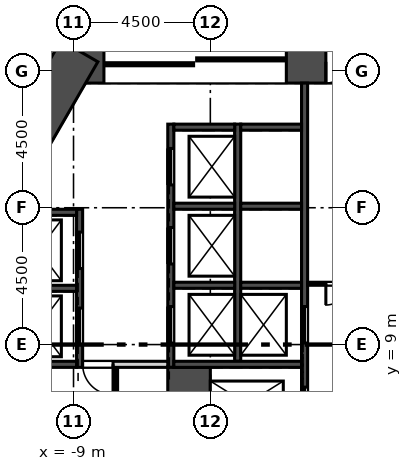
"""IFC4 building model, lengths in metres.
Left out: names, types, materials, properties, quantities, classifications, styles, units other than length and angle.
Written with IfcOpenShell. Run it as: python <this file> out.ifc"""

import sys

from ifc_helpers import new_model, si_unit, direction, frame, frame_2d, origin, place, context, subcontext, project, spatial, rectangle, extrude, element, fill, save


model = new_model("IFC4")
c1 = context("Model", 3, precision=1e-05, world=origin(), true_north=direction((0.0, 1.0)))
c2 = subcontext(c1, "Body", "Model", "MODEL_VIEW")
j1 = project(units=[si_unit("LENGTHUNIT", "METRE"), si_unit("PLANEANGLEUNIT", "RADIAN")], contexts=[c1])
p1 = place(None, origin())
s1 = spatial("IfcSite", under=j1, at=p1, CompositionType="ELEMENT")
p2 = place(p1, origin())
s2 = spatial("IfcBuilding", under=s1, at=p2, CompositionType="ELEMENT")
p3 = place(p2, frame((0.0, 0.0, 20.0)))
s3 = spatial("IfcBuildingStorey", under=s2, at=p3, CompositionType="ELEMENT", Elevation=20.0)
p4 = place(p3, frame((9.412, 18.3, 0.0), z_axis=(0.0, 0.0, 1.0), x_axis=(-1.0, 0.0, 0.0)))
e1 = element("IfcWall", 1, at=p4, inside=s3, PredefinedType="SHEAR", context=c2, shape_type="SweptSolid", body=[
    extrude(rectangle(XDim=18.823, YDim=1.4, at=frame_2d((9.412, 0.0))), origin(), (0.0, 0.0, 1.0), 5.0),
])
p5 = place(p4, frame((8.711, 0.0, 0.0)))
e2 = element("IfcOpeningElement", 2, at=p5, cuts=e1, PredefinedType="OPENING", context=c2, shape_type="SweptSolid", body=[
    extrude(rectangle(XDim=1.4, YDim=2.1, at=frame_2d((0.7, 1.05))), frame((0.0, 0.71, 0.0), z_axis=(0.0, -1.0, 0.0), x_axis=(1.0, 0.0, 0.0)), (0.0, 0.0, 1.0), 1.42),
])
p6 = place(p4, frame((11.412, 0.0, 0.0)))
e3 = element("IfcOpeningElement", 3, at=p6, cuts=e1, PredefinedType="OPENING", context=c2, shape_type="SweptSolid", body=[
    extrude(rectangle(XDim=6.0, YDim=2.4, at=frame_2d((3.0, 1.2))), frame((0.0, 0.71, 0.0), z_axis=(0.0, -1.0, 0.0), x_axis=(1.0, 0.0, 0.0)), (0.0, 0.0, 1.0), 1.42),
])
p7 = place(p4, frame((1.412, 0.0, 0.0)))
e4 = element("IfcOpeningElement", 4, at=p7, cuts=e1, PredefinedType="OPENING", context=c2, shape_type="SweptSolid", body=[
    extrude(rectangle(XDim=6.0, YDim=2.4, at=frame_2d((3.0, 1.2))), frame((0.0, 0.71, 0.0), z_axis=(0.0, -1.0, 0.0), x_axis=(1.0, 0.0, 0.0)), (0.0, 0.0, 1.0), 1.42),
])
p8 = place(p3, frame((-8.805, 18.65, 0.0), z_axis=(0.0, 0.0, 1.0), x_axis=(-0.50000187635, -0.866024320471, 0.0)))
e5 = element("IfcWall", 5, at=p8, inside=s3, PredefinedType="SHEAR", context=c2, shape_type="SweptSolid", body=[
    extrude(rectangle(XDim=9.177, YDim=1.4, at=frame_2d((4.588, 0.0))), origin(), (0.0, 0.0, 1.0), 5.0),
])
p9 = place(p3, frame((-4.853, 74.393, 0.0), z_axis=(0.0, 0.0, 1.0), x_axis=(-0.49999894854, -0.866026010844, 0.0)))
e6 = element("IfcWall", 6, at=p9, inside=s3, PredefinedType="SOLIDWALL", context=c2, shape_type="SweptSolid", body=[
    extrude(rectangle(XDim=76.0, YDim=0.34, at=frame_2d((38.0, 0.0))), origin(), (0.0, 0.0, 1.0), 3.0),
])
p10 = place(p9, frame((1.058, 0.0, 0.9)))
e7 = element("IfcOpeningElement", 7, at=p10, cuts=e6, PredefinedType="OPENING", context=c2, shape_type="SweptSolid", body=[
    extrude(rectangle(XDim=1.885, YDim=1.9, at=frame_2d((0.942, 0.95))), frame((0.0, 0.18, 0.0), z_axis=(0.0, -1.0, 0.0), x_axis=(1.0, 0.0, 0.0)), (0.0, 0.0, 1.0), 0.36),
])
p11 = place(p9, frame((4.058, 0.0, 0.9)))
e8 = element("IfcOpeningElement", 8, at=p11, cuts=e6, PredefinedType="OPENING", context=c2, shape_type="SweptSolid", body=[
    extrude(rectangle(XDim=1.885, YDim=1.9, at=frame_2d((0.942, 0.95))), frame((0.0, 0.18, 0.0), z_axis=(0.0, -1.0, 0.0), x_axis=(1.0, 0.0, 0.0)), (0.0, 0.0, 1.0), 0.36),
])
p12 = place(p9, frame((7.058, 0.0, 0.9)))
e9 = element("IfcOpeningElement", 9, at=p12, cuts=e6, PredefinedType="OPENING", context=c2, shape_type="SweptSolid", body=[
    extrude(rectangle(XDim=1.885, YDim=1.9, at=frame_2d((0.942, 0.95))), frame((0.0, 0.18, 0.0), z_axis=(0.0, -1.0, 0.0), x_axis=(1.0, 0.0, 0.0)), (0.0, 0.0, 1.0), 0.36),
])
p13 = place(p9, frame((10.058, 0.0, 0.9)))
e10 = element("IfcOpeningElement", 10, at=p13, cuts=e6, PredefinedType="OPENING", context=c2, shape_type="SweptSolid", body=[
    extrude(rectangle(XDim=1.885, YDim=1.9, at=frame_2d((0.942, 0.95))), frame((0.0, 0.18, 0.0), z_axis=(0.0, -1.0, 0.0), x_axis=(1.0, 0.0, 0.0)), (0.0, 0.0, 1.0), 0.36),
])
p14 = place(p9, frame((13.058, 0.0, 0.9)))
e11 = element("IfcOpeningElement", 11, at=p14, cuts=e6, PredefinedType="OPENING", context=c2, shape_type="SweptSolid", body=[
    extrude(rectangle(XDim=1.885, YDim=1.9, at=frame_2d((0.942, 0.95))), frame((0.0, 0.18, 0.0), z_axis=(0.0, -1.0, 0.0), x_axis=(1.0, 0.0, 0.0)), (0.0, 0.0, 1.0), 0.36),
])
p15 = place(p9, frame((16.058, 0.0, 0.9)))
e12 = element("IfcOpeningElement", 12, at=p15, cuts=e6, PredefinedType="OPENING", context=c2, shape_type="SweptSolid", body=[
    extrude(rectangle(XDim=1.885, YDim=1.9, at=frame_2d((0.942, 0.95))), frame((0.0, 0.18, 0.0), z_axis=(0.0, -1.0, 0.0), x_axis=(1.0, 0.0, 0.0)), (0.0, 0.0, 1.0), 0.36),
])
p16 = place(p9, frame((19.058, 0.0, 0.9)))
e13 = element("IfcOpeningElement", 13, at=p16, cuts=e6, PredefinedType="OPENING", context=c2, shape_type="SweptSolid", body=[
    extrude(rectangle(XDim=1.885, YDim=1.9, at=frame_2d((0.942, 0.95))), frame((0.0, 0.18, 0.0), z_axis=(0.0, -1.0, 0.0), x_axis=(1.0, 0.0, 0.0)), (0.0, 0.0, 1.0), 0.36),
])
p17 = place(p9, frame((22.058, 0.0, 0.9)))
e14 = element("IfcOpeningElement", 14, at=p17, cuts=e6, PredefinedType="OPENING", context=c2, shape_type="SweptSolid", body=[
    extrude(rectangle(XDim=1.885, YDim=1.9, at=frame_2d((0.942, 0.95))), frame((0.0, 0.18, 0.0), z_axis=(0.0, -1.0, 0.0), x_axis=(1.0, 0.0, 0.0)), (0.0, 0.0, 1.0), 0.36),
])
p18 = place(p9, frame((25.058, 0.0, 0.9)))
e15 = element("IfcOpeningElement", 15, at=p18, cuts=e6, PredefinedType="OPENING", context=c2, shape_type="SweptSolid", body=[
    extrude(rectangle(XDim=1.885, YDim=1.9, at=frame_2d((0.942, 0.95))), frame((0.0, 0.18, 0.0), z_axis=(0.0, -1.0, 0.0), x_axis=(1.0, 0.0, 0.0)), (0.0, 0.0, 1.0), 0.36),
])
p19 = place(p9, frame((28.058, 0.0, 0.9)))
e16 = element("IfcOpeningElement", 16, at=p19, cuts=e6, PredefinedType="OPENING", context=c2, shape_type="SweptSolid", body=[
    extrude(rectangle(XDim=1.885, YDim=1.9, at=frame_2d((0.942, 0.95))), frame((0.0, 0.18, 0.0), z_axis=(0.0, -1.0, 0.0), x_axis=(1.0, 0.0, 0.0)), (0.0, 0.0, 1.0), 0.36),
])
p20 = place(p9, frame((31.058, 0.0, 0.9)))
e17 = element("IfcOpeningElement", 17, at=p20, cuts=e6, PredefinedType="OPENING", context=c2, shape_type="SweptSolid", body=[
    extrude(rectangle(XDim=1.885, YDim=1.9, at=frame_2d((0.942, 0.95))), frame((0.0, 0.18, 0.0), z_axis=(0.0, -1.0, 0.0), x_axis=(1.0, 0.0, 0.0)), (0.0, 0.0, 1.0), 0.36),
])
p21 = place(p9, frame((34.058, 0.0, 0.9)))
e18 = element("IfcOpeningElement", 18, at=p21, cuts=e6, PredefinedType="OPENING", context=c2, shape_type="SweptSolid", body=[
    extrude(rectangle(XDim=1.885, YDim=1.9, at=frame_2d((0.942, 0.95))), frame((0.0, 0.18, 0.0), z_axis=(0.0, -1.0, 0.0), x_axis=(1.0, 0.0, 0.0)), (0.0, 0.0, 1.0), 0.36),
])
p22 = place(p9, frame((37.058, 0.0, 0.9)))
e19 = element("IfcOpeningElement", 19, at=p22, cuts=e6, PredefinedType="OPENING", context=c2, shape_type="SweptSolid", body=[
    extrude(rectangle(XDim=1.885, YDim=1.9, at=frame_2d((0.942, 0.95))), frame((0.0, 0.18, 0.0), z_axis=(0.0, -1.0, 0.0), x_axis=(1.0, 0.0, 0.0)), (0.0, 0.0, 1.0), 0.36),
])
p23 = place(p9, frame((40.058, 0.0, 0.9)))
e20 = element("IfcOpeningElement", 20, at=p23, cuts=e6, PredefinedType="OPENING", context=c2, shape_type="SweptSolid", body=[
    extrude(rectangle(XDim=1.885, YDim=1.9, at=frame_2d((0.942, 0.95))), frame((0.0, 0.18, 0.0), z_axis=(0.0, -1.0, 0.0), x_axis=(1.0, 0.0, 0.0)), (0.0, 0.0, 1.0), 0.36),
])
p24 = place(p9, frame((43.058, 0.0, 0.9)))
e21 = element("IfcOpeningElement", 21, at=p24, cuts=e6, PredefinedType="OPENING", context=c2, shape_type="SweptSolid", body=[
    extrude(rectangle(XDim=1.885, YDim=1.9, at=frame_2d((0.942, 0.95))), frame((0.0, 0.18, 0.0), z_axis=(0.0, -1.0, 0.0), x_axis=(1.0, 0.0, 0.0)), (0.0, 0.0, 1.0), 0.36),
])
p25 = place(p9, frame((46.058, 0.0, 0.9)))
e22 = element("IfcOpeningElement", 22, at=p25, cuts=e6, PredefinedType="OPENING", context=c2, shape_type="SweptSolid", body=[
    extrude(rectangle(XDim=1.885, YDim=1.9, at=frame_2d((0.942, 0.95))), frame((0.0, 0.18, 0.0), z_axis=(0.0, -1.0, 0.0), x_axis=(1.0, 0.0, 0.0)), (0.0, 0.0, 1.0), 0.36),
])
p26 = place(p9, frame((49.058, 0.0, 0.9)))
e23 = element("IfcOpeningElement", 23, at=p26, cuts=e6, PredefinedType="OPENING", context=c2, shape_type="SweptSolid", body=[
    extrude(rectangle(XDim=1.885, YDim=1.9, at=frame_2d((0.942, 0.95))), frame((0.0, 0.18, 0.0), z_axis=(0.0, -1.0, 0.0), x_axis=(1.0, 0.0, 0.0)), (0.0, 0.0, 1.0), 0.36),
])
p27 = place(p9, frame((52.058, 0.0, 0.9)))
e24 = element("IfcOpeningElement", 24, at=p27, cuts=e6, PredefinedType="OPENING", context=c2, shape_type="SweptSolid", body=[
    extrude(rectangle(XDim=1.885, YDim=1.9, at=frame_2d((0.942, 0.95))), frame((0.0, 0.18, 0.0), z_axis=(0.0, -1.0, 0.0), x_axis=(1.0, 0.0, 0.0)), (0.0, 0.0, 1.0), 0.36),
])
p28 = place(p9, frame((55.058, 0.0, 0.9)))
e25 = element("IfcOpeningElement", 25, at=p28, cuts=e6, PredefinedType="OPENING", context=c2, shape_type="SweptSolid", body=[
    extrude(rectangle(XDim=1.885, YDim=1.9, at=frame_2d((0.942, 0.95))), frame((0.0, 0.18, 0.0), z_axis=(0.0, -1.0, 0.0), x_axis=(1.0, 0.0, 0.0)), (0.0, 0.0, 1.0), 0.36),
])
p29 = place(p9, frame((58.058, 0.0, 0.9)))
e26 = element("IfcOpeningElement", 26, at=p29, cuts=e6, PredefinedType="OPENING", context=c2, shape_type="SweptSolid", body=[
    extrude(rectangle(XDim=1.885, YDim=1.9, at=frame_2d((0.942, 0.95))), frame((0.0, 0.18, 0.0), z_axis=(0.0, -1.0, 0.0), x_axis=(1.0, 0.0, 0.0)), (0.0, 0.0, 1.0), 0.36),
])
p30 = place(p9, frame((61.058, 0.0, 0.9)))
e27 = element("IfcOpeningElement", 27, at=p30, cuts=e6, PredefinedType="OPENING", context=c2, shape_type="SweptSolid", body=[
    extrude(rectangle(XDim=1.885, YDim=1.9, at=frame_2d((0.942, 0.95))), frame((0.0, 0.18, 0.0), z_axis=(0.0, -1.0, 0.0), x_axis=(1.0, 0.0, 0.0)), (0.0, 0.0, 1.0), 0.36),
])
p31 = place(p9, frame((64.058, 0.0, 0.9)))
e28 = element("IfcOpeningElement", 28, at=p31, cuts=e6, PredefinedType="OPENING", context=c2, shape_type="SweptSolid", body=[
    extrude(rectangle(XDim=1.885, YDim=1.9, at=frame_2d((0.942, 0.95))), frame((0.0, 0.18, 0.0), z_axis=(0.0, -1.0, 0.0), x_axis=(1.0, 0.0, 0.0)), (0.0, 0.0, 1.0), 0.36),
])
p32 = place(p9, frame((67.058, 0.0, 0.9)))
e29 = element("IfcOpeningElement", 29, at=p32, cuts=e6, PredefinedType="OPENING", context=c2, shape_type="SweptSolid", body=[
    extrude(rectangle(XDim=1.885, YDim=1.9, at=frame_2d((0.942, 0.95))), frame((0.0, 0.18, 0.0), z_axis=(0.0, -1.0, 0.0), x_axis=(1.0, 0.0, 0.0)), (0.0, 0.0, 1.0), 0.36),
])
p33 = place(p9, frame((70.058, 0.0, 0.9)))
e30 = element("IfcOpeningElement", 30, at=p33, cuts=e6, PredefinedType="OPENING", context=c2, shape_type="SweptSolid", body=[
    extrude(rectangle(XDim=1.885, YDim=1.9, at=frame_2d((0.942, 0.95))), frame((0.0, 0.18, 0.0), z_axis=(0.0, -1.0, 0.0), x_axis=(1.0, 0.0, 0.0)), (0.0, 0.0, 1.0), 0.36),
])
p34 = place(p9, frame((73.058, 0.0, 0.9)))
e31 = element("IfcOpeningElement", 31, at=p34, cuts=e6, PredefinedType="OPENING", context=c2, shape_type="SweptSolid", body=[
    extrude(rectangle(XDim=1.885, YDim=1.9, at=frame_2d((0.942, 0.95))), frame((0.0, 0.18, 0.0), z_axis=(0.0, -1.0, 0.0), x_axis=(1.0, 0.0, 0.0)), (0.0, 0.0, 1.0), 0.36),
])
p35 = place(p3, frame((-8.8, 8.25, -0.3), z_axis=(0.0, 0.0, 1.0), x_axis=(0.0, 1.0, 0.0)))
e32 = element("IfcWall", 32, at=p35, inside=s3, PredefinedType="SOLIDWALL", context=c2, shape_type="SweptSolid", body=[
    extrude(rectangle(XDim=5.2, YDim=0.2, at=frame_2d((2.6, 0.0))), origin(), (0.0, 0.0, 1.0), 3.3),
])
p36 = place(p35, frame((0.75, 0.0, 0.3)))
e33 = element("IfcOpeningElement", 33, at=p36, cuts=e32, PredefinedType="OPENING", context=c2, shape_type="SweptSolid", body=[
    extrude(rectangle(XDim=1.2, YDim=2.1, at=frame_2d((0.6, 1.05))), frame((0.0, 0.11, 0.0), z_axis=(0.0, -1.0, 0.0), x_axis=(1.0, 0.0, 0.0)), (0.0, 0.0, 1.0), 0.22),
])
p37 = place(p35, frame((3.25, 0.0, 0.3)))
e34 = element("IfcOpeningElement", 34, at=p37, cuts=e32, PredefinedType="OPENING", context=c2, shape_type="SweptSolid", body=[
    extrude(rectangle(XDim=1.2, YDim=2.1, at=frame_2d((0.6, 1.05))), frame((0.0, 0.11, 0.0), z_axis=(0.0, -1.0, 0.0), x_axis=(1.0, 0.0, 0.0)), (0.0, 0.0, 1.0), 0.22),
])
p38 = place(p3, frame((-5.8, 8.25, -0.3), z_axis=(0.0, 0.0, 1.0), x_axis=(0.0, 1.0, 0.0)))
e35 = element("IfcWall", 35, at=p38, inside=s3, PredefinedType="SOLIDWALL", context=c2, shape_type="SweptSolid", body=[
    extrude(rectangle(XDim=8.0, YDim=0.2, at=frame_2d((4.0, 0.0))), origin(), (0.0, 0.0, 1.0), 3.3),
])
p39 = place(p38, frame((0.8, 0.0, 0.3)))
e36 = element("IfcOpeningElement", 36, at=p39, cuts=e35, PredefinedType="OPENING", context=c2, shape_type="SweptSolid", body=[
    extrude(rectangle(XDim=1.2, YDim=2.1, at=frame_2d((0.6, 1.05))), frame((0.0, 0.11, 0.0), z_axis=(0.0, -1.0, 0.0), x_axis=(1.0, 0.0, 0.0)), (0.0, 0.0, 1.0), 0.22),
])
p40 = place(p38, frame((3.4, 0.0, 0.3)))
e37 = element("IfcOpeningElement", 37, at=p40, cuts=e35, PredefinedType="OPENING", context=c2, shape_type="SweptSolid", body=[
    extrude(rectangle(XDim=1.2, YDim=2.1, at=frame_2d((0.6, 1.05))), frame((0.0, 0.11, 0.0), z_axis=(0.0, -1.0, 0.0), x_axis=(1.0, 0.0, 0.0)), (0.0, 0.0, 1.0), 0.22),
])
p41 = place(p38, frame((6.0, 0.0, 0.3)))
e38 = element("IfcOpeningElement", 38, at=p41, cuts=e35, PredefinedType="OPENING", context=c2, shape_type="SweptSolid", body=[
    extrude(rectangle(XDim=1.2, YDim=2.1, at=frame_2d((0.6, 1.05))), frame((0.0, 0.11, 0.0), z_axis=(0.0, -1.0, 0.0), x_axis=(1.0, 0.0, 0.0)), (0.0, 0.0, 1.0), 0.22),
])
p42 = place(p3, frame((-3.6, 8.45, -0.3), z_axis=(0.0, 0.0, 1.0), x_axis=(0.0, 1.0, 0.0)))
e39 = element("IfcWall", 39, at=p42, inside=s3, PredefinedType="SOLIDWALL", context=c2, shape_type="SweptSolid", body=[
    extrude(rectangle(XDim=7.8, YDim=0.2, at=frame_2d((3.9, 0.0))), origin(), (0.0, 0.0, 1.0), 3.3),
])
p43 = place(p3, frame((-1.4, 5.85, -0.3), z_axis=(0.0, 0.0, 1.0), x_axis=(0.0, 1.0, 0.0)))
e40 = element("IfcWall", 40, at=p43, inside=s3, PredefinedType="SOLIDWALL", context=c2, shape_type="SweptSolid", body=[
    extrude(rectangle(XDim=11.75, YDim=0.2, at=frame_2d((5.875, 0.0))), origin(), (0.0, 0.0, 1.0), 3.3),
])
p44 = place(p43, frame((3.2, 0.0, 0.3)))
e41 = element("IfcOpeningElement", 41, at=p44, cuts=e40, PredefinedType="OPENING", context=c2, shape_type="SweptSolid", body=[
    extrude(rectangle(XDim=1.2, YDim=2.1, at=frame_2d((0.6, 1.05))), frame((0.0, 0.11, 0.0), z_axis=(0.0, -1.0, 0.0), x_axis=(1.0, 0.0, 0.0)), (0.0, 0.0, 1.0), 0.22),
])
p45 = place(p43, frame((0.65, 0.0, 0.3)))
e42 = element("IfcOpeningElement", 42, at=p45, cuts=e40, PredefinedType="OPENING", context=c2, shape_type="SweptSolid", body=[
    extrude(rectangle(XDim=1.1, YDim=2.1, at=frame_2d((0.55, 1.05))), frame((0.0, 0.11, 0.0), z_axis=(0.0, -1.0, 0.0), x_axis=(1.0, 0.0, 0.0)), (0.0, 0.0, 1.0), 0.22),
])
p46 = place(p3, frame((-5.2, 5.85, -0.3), z_axis=(0.0, 0.0, 1.0), x_axis=(0.0, 1.0, 0.0)))
e43 = element("IfcWall", 43, at=p46, inside=s3, PredefinedType="SOLIDWALL", context=c2, shape_type="SweptSolid", body=[
    extrude(rectangle(XDim=2.4, YDim=1.4, at=frame_2d((1.2, 0.0))), origin(), (0.0, 0.0, 1.0), 3.3),
])
p47 = place(p3, frame((-10.9, 8.35, -0.3), z_axis=(0.0, 0.0, 1.0), x_axis=(1.0, 0.0, 0.0)))
e44 = element("IfcWall", 44, at=p47, inside=s3, PredefinedType="SOLIDWALL", context=c2, shape_type="SweptSolid", body=[
    extrude(rectangle(XDim=2.0, YDim=0.2, at=frame_2d((1.0, 0.0))), origin(), (0.0, 0.0, 1.0), 3.3),
])
p48 = place(p3, frame((-5.7, 8.35, -0.3), z_axis=(0.0, 0.0, 1.0), x_axis=(1.0, 0.0, 0.0)))
e45 = element("IfcWall", 45, at=p48, inside=s3, PredefinedType="SOLIDWALL", context=c2, shape_type="SweptSolid", body=[
    extrude(rectangle(XDim=4.2, YDim=0.2, at=frame_2d((2.1, 0.0))), origin(), (0.0, 0.0, 1.0), 3.3),
])
for number, where, z_axis, x_axis in (
    (46, (-10.9, 10.85, -0.3), (0.0, 0.0, 1.0), (1.0, 0.0, 0.0)),
    (47, (-10.9, 13.35, -0.3), (0.0, 0.0, 1.0), (1.0, 0.0, 0.0)),
    (48, (-5.7, 10.95, -0.3), (0.0, 0.0, 1.0), (1.0, 0.0, 0.0)),
    (49, (-5.7, 13.55, -0.3), (0.0, 0.0, 1.0), (1.0, 0.0, 0.0)),
    (50, (-5.7, 16.15, -0.3), (0.0, 0.0, 1.0), (1.0, 0.0, 0.0)),
    (51, (-3.5, 10.95, -0.3), (0.0, 0.0, 1.0), (1.0, 0.0, 0.0)),
    (52, (-3.5, 13.55, -0.3), (0.0, 0.0, 1.0), (1.0, 0.0, 0.0)),
    (53, (-3.5, 16.15, -0.3), (0.0, 0.0, 1.0), (1.0, 0.0, 0.0)),
):
    element("IfcWall", number, at=place(p3, frame(where, z_axis=z_axis, x_axis=x_axis)), inside=s3, PredefinedType="SOLIDWALL", context=c2, shape_type="SweptSolid", body=[
        extrude(rectangle(XDim=2.0, YDim=0.2, at=frame_2d((1.0, 0.0))), origin(), (0.0, 0.0, 1.0), 3.3),
    ])
p49 = place(p3, frame((-7.6, 5.85, 0.0), z_axis=(0.0, 0.0, 1.0), x_axis=(0.0, 1.0, 0.0)))
e54 = element("IfcWall", 54, at=p49, inside=s3, PredefinedType="PARTITIONING", context=c2, shape_type="SweptSolid", body=[
    extrude(rectangle(XDim=2.4, YDim=0.1, at=frame_2d((1.2, 0.0))), origin(), (0.0, 0.0, 1.0), 3.0),
])
p50 = place(p49, frame((0.7, 0.0, 0.0)))
e55 = element("IfcOpeningElement", 55, at=p50, cuts=e54, PredefinedType="OPENING", context=c2, shape_type="SweptSolid", body=[
    extrude(rectangle(XDim=0.9, YDim=2.1, at=frame_2d((0.45, 1.05))), frame((0.0, 0.06, 0.0), z_axis=(0.0, -1.0, 0.0), x_axis=(1.0, 0.0, 0.0)), (0.0, 0.0, 1.0), 0.12),
])
p51 = place(p3, frame((-8.7, 8.35, 0.0), z_axis=(0.0, 0.0, 1.0), x_axis=(1.0, 0.0, 0.0)))
e56 = element("IfcWall", 56, at=p51, inside=s3, PredefinedType="SOLIDWALL", context=c2, shape_type="SweptSolid", body=[
    extrude(rectangle(XDim=2.8, YDim=0.2, at=frame_2d((1.4, 0.0))), origin(), (0.0, 0.0, 1.0), 3.0),
])
p52 = place(p51, origin())
e57 = element("IfcOpeningElement", 57, at=p52, cuts=e56, PredefinedType="OPENING", context=c2, shape_type="SweptSolid", body=[
    extrude(rectangle(XDim=1.0, YDim=2.1, at=frame_2d((0.5, 1.05))), frame((0.0, 0.11, 0.0), z_axis=(0.0, -1.0, 0.0), x_axis=(1.0, 0.0, 0.0)), (0.0, 0.0, 1.0), 0.22),
])
p53 = place(p3, frame((-1.3, 11.0, 0.0), z_axis=(0.0, 0.0, 1.0), x_axis=(1.0, 0.0, 0.0)))
e58 = element("IfcWall", 58, at=p53, inside=s3, PredefinedType="PARTITIONING", context=c2, shape_type="SweptSolid", body=[
    extrude(rectangle(XDim=2.6, YDim=0.1, at=frame_2d((1.3, 0.0))), origin(), (0.0, 0.0, 1.0), 3.0),
])
p54 = place(p53, frame((0.6, 0.0, 0.0)))
e59 = element("IfcOpeningElement", 59, at=p54, cuts=e58, PredefinedType="OPENING", context=c2, shape_type="SweptSolid", body=[
    extrude(rectangle(XDim=1.4, YDim=2.1, at=frame_2d((0.7, 1.05))), frame((0.0, 0.06, 0.0), z_axis=(0.0, -1.0, 0.0), x_axis=(1.0, 0.0, 0.0)), (0.0, 0.0, 1.0), 0.12),
])
p55 = place(p36, origin())
e60 = element("IfcDoor", 60, at=p55, inside=s3, OperationType="SLIDING_TO_LEFT", PredefinedType="DOOR", context=c2, shape_type="SweptSolid", body=[
    extrude(rectangle(XDim=1.2, YDim=2.1, at=frame_2d((0.6, 1.05))), frame((0.0, 0.025, 0.0), z_axis=(0.0, -1.0, 0.0), x_axis=(1.0, 0.0, 0.0)), (0.0, 0.0, 1.0), 0.05),
])
fill(e33, e60)
p56 = place(p37, origin())
e61 = element("IfcDoor", 61, at=p56, inside=s3, OperationType="SLIDING_TO_LEFT", PredefinedType="DOOR", context=c2, shape_type="SweptSolid", body=[
    extrude(rectangle(XDim=1.2, YDim=2.1, at=frame_2d((0.6, 1.05))), frame((0.0, 0.025, 0.0), z_axis=(0.0, -1.0, 0.0), x_axis=(1.0, 0.0, 0.0)), (0.0, 0.0, 1.0), 0.05),
])
fill(e34, e61)
p57 = place(p39, origin())
e62 = element("IfcDoor", 62, at=p57, inside=s3, OperationType="SLIDING_TO_LEFT", PredefinedType="DOOR", context=c2, shape_type="SweptSolid", body=[
    extrude(rectangle(XDim=1.2, YDim=2.1, at=frame_2d((0.6, 1.05))), frame((0.0, 0.025, 0.0), z_axis=(0.0, -1.0, 0.0), x_axis=(1.0, 0.0, 0.0)), (0.0, 0.0, 1.0), 0.05),
])
fill(e36, e62)
p58 = place(p40, origin())
e63 = element("IfcDoor", 63, at=p58, inside=s3, OperationType="SLIDING_TO_LEFT", PredefinedType="DOOR", context=c2, shape_type="SweptSolid", body=[
    extrude(rectangle(XDim=1.2, YDim=2.1, at=frame_2d((0.6, 1.05))), frame((0.0, 0.025, 0.0), z_axis=(0.0, -1.0, 0.0), x_axis=(1.0, 0.0, 0.0)), (0.0, 0.0, 1.0), 0.05),
])
fill(e37, e63)
p59 = place(p41, origin())
e64 = element("IfcDoor", 64, at=p59, inside=s3, OperationType="SLIDING_TO_LEFT", PredefinedType="DOOR", context=c2, shape_type="SweptSolid", body=[
    extrude(rectangle(XDim=1.2, YDim=2.1, at=frame_2d((0.6, 1.05))), frame((0.0, 0.025, 0.0), z_axis=(0.0, -1.0, 0.0), x_axis=(1.0, 0.0, 0.0)), (0.0, 0.0, 1.0), 0.05),
])
fill(e38, e64)
p60 = place(p44, origin())
e65 = element("IfcDoor", 65, at=p60, inside=s3, OperationType="SLIDING_TO_LEFT", PredefinedType="DOOR", context=c2, shape_type="SweptSolid", body=[
    extrude(rectangle(XDim=1.2, YDim=2.1, at=frame_2d((0.6, 1.05))), frame((0.0, 0.025, 0.0), z_axis=(0.0, -1.0, 0.0), x_axis=(1.0, 0.0, 0.0)), (0.0, 0.0, 1.0), 0.05),
])
fill(e41, e65)
p61 = place(p45, origin())
e66 = element("IfcDoor", 66, at=p61, inside=s3, OperationType="SLIDING_TO_RIGHT", PredefinedType="DOOR", context=c2, shape_type="SweptSolid", body=[
    extrude(rectangle(XDim=1.1, YDim=2.1, at=frame_2d((0.55, 1.05))), frame((0.0, 0.025, 0.0), z_axis=(0.0, -1.0, 0.0), x_axis=(1.0, 0.0, 0.0)), (0.0, 0.0, 1.0), 0.05),
])
fill(e42, e66)
p62 = place(p52, frame((1.0, 0.0, 0.0), z_axis=(0.0, 0.0, 1.0), x_axis=(-1.0, 0.0, 0.0)))
e67 = element("IfcDoor", 67, at=p62, inside=s3, OperationType="SINGLE_SWING_LEFT", PredefinedType="DOOR", context=c2, shape_type="SweptSolid", body=[
    extrude(rectangle(XDim=1.0, YDim=2.1, at=frame_2d((0.5, 1.05))), frame((0.0, 0.025, 0.0), z_axis=(0.0, -1.0, 0.0), x_axis=(1.0, 0.0, 0.0)), (0.0, 0.0, 1.0), 0.05),
])
fill(e57, e67)
p63 = place(p54, frame((1.4, 0.0, 0.0), z_axis=(0.0, 0.0, 1.0), x_axis=(-1.0, 0.0, 0.0)))
e68 = element("IfcDoor", 68, at=p63, inside=s3, OperationType="DOUBLE_DOOR_SINGLE_SWING", PredefinedType="DOOR", context=c2, shape_type="SweptSolid", body=[
    extrude(rectangle(XDim=1.4, YDim=2.1, at=frame_2d((0.7, 1.05))), frame((0.0, 0.025, 0.0), z_axis=(0.0, -1.0, 0.0), x_axis=(1.0, 0.0, 0.0)), (0.0, 0.0, 1.0), 0.05),
])
fill(e59, e68)
p64 = place(p5, origin())
e69 = element("IfcDoor", 69, at=p64, inside=s3, OperationType="DOUBLE_DOOR_SINGLE_SWING", PredefinedType="DOOR", context=c2, shape_type="SweptSolid", body=[
    extrude(rectangle(XDim=1.4, YDim=2.1, at=frame_2d((0.7, 1.05))), frame((0.0, 0.025, 0.0), z_axis=(0.0, -1.0, 0.0), x_axis=(1.0, 0.0, 0.0)), (0.0, 0.0, 1.0), 0.05),
])
fill(e2, e69)
p65 = place(p6, origin())
e70 = element("IfcDoor", 70, at=p65, inside=s3, OperationType="DOUBLE_DOOR_SLIDING", PredefinedType="DOOR", context=c2, shape_type="SweptSolid", body=[
    extrude(rectangle(XDim=6.0, YDim=2.4, at=frame_2d((3.0, 1.2))), frame((0.0, 0.025, 0.0), z_axis=(0.0, -1.0, 0.0), x_axis=(1.0, 0.0, 0.0)), (0.0, 0.0, 1.0), 0.05),
])
fill(e3, e70)
save(model, sys.argv[1])
